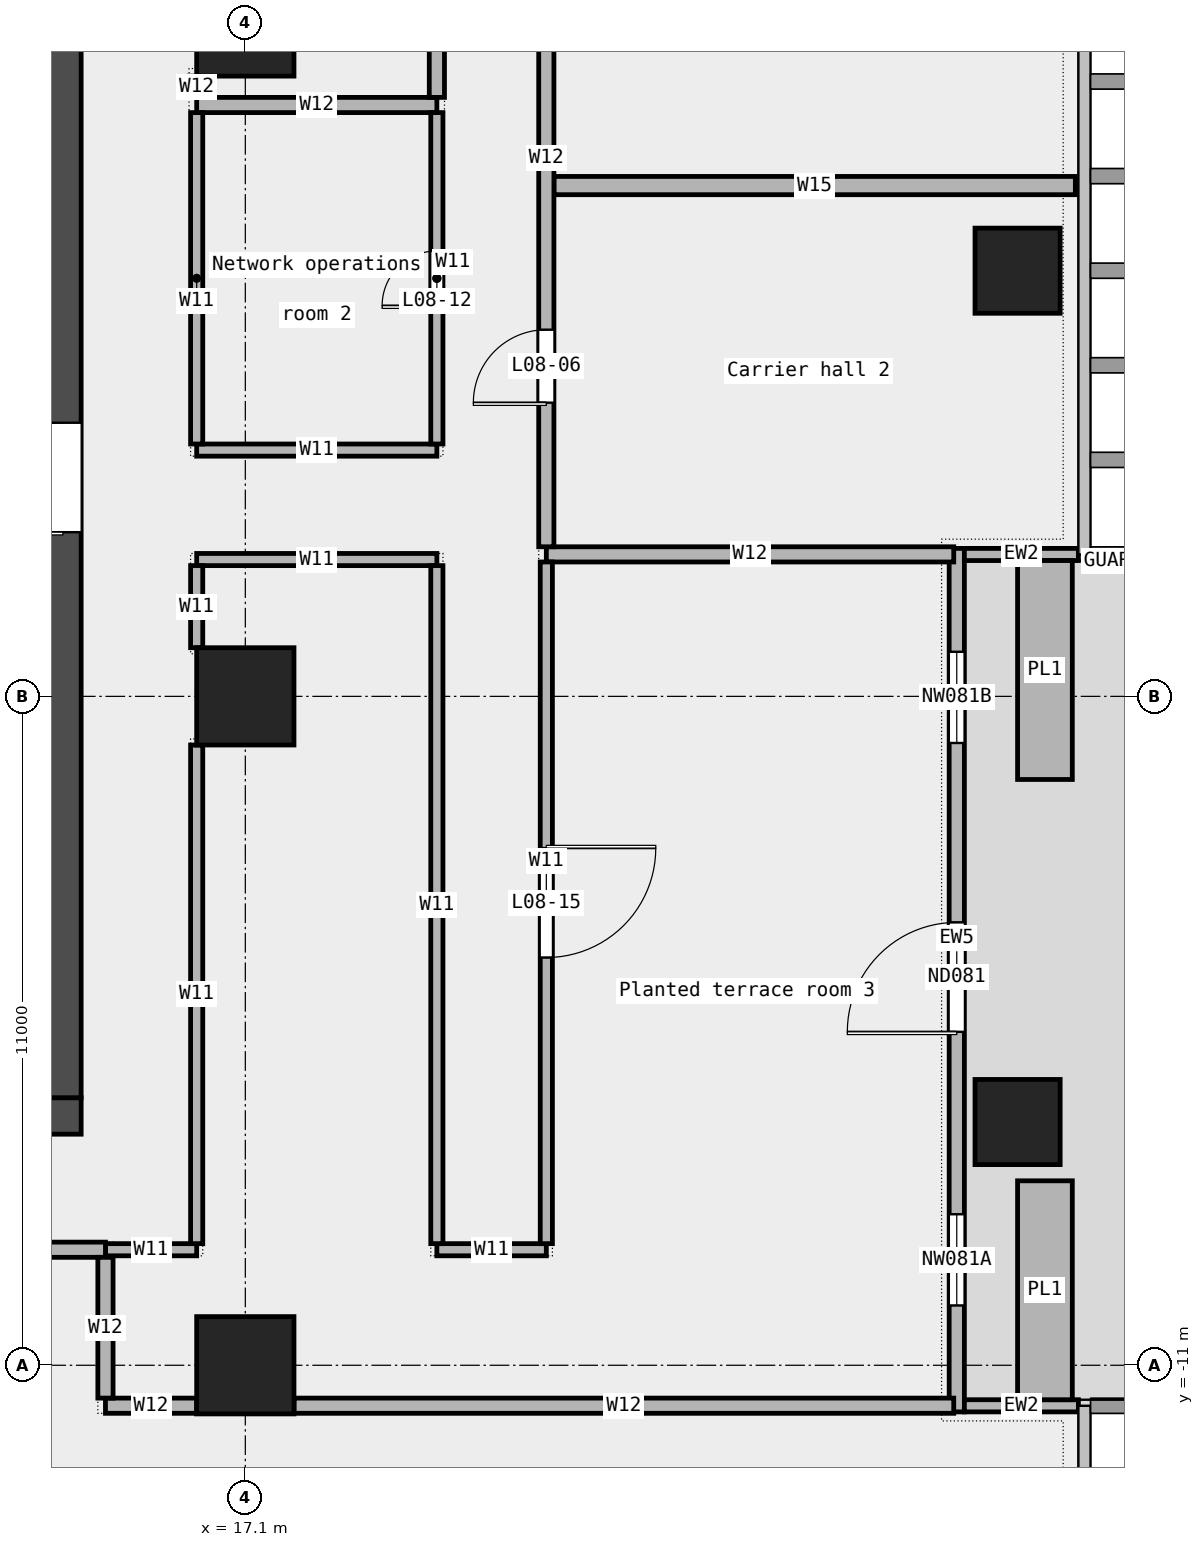
"""IFC4 building model, lengths in metres.
Left out: names, types, materials, properties, quantities, classifications, styles, units other than length and angle.
Written with IfcOpenShell. Run it as: python <this file> out.ifc"""

import sys

from ifc_helpers import new_model, si_unit, direction, frame, frame_2d, origin, origin_2d, place, context, subcontext, project, spatial, rectangle, extrude, element, fill, save


model = new_model("IFC4")
c1 = context("Model", 3, precision=1e-05, world=origin(), true_north=direction((0.0, 1.0)))
c2 = subcontext(c1, "Body", "Model", "MODEL_VIEW")
j1 = project(units=[si_unit("LENGTHUNIT", "METRE"), si_unit("PLANEANGLEUNIT", "RADIAN")], contexts=[c1])
p1 = place(None, origin())
s1 = spatial("IfcSite", under=j1, at=p1, CompositionType="ELEMENT")
p2 = place(p1, origin())
s2 = spatial("IfcBuilding", under=s1, at=p2, CompositionType="ELEMENT")
p3 = place(p2, frame((0.0, 0.0, 45.4)))
s3 = spatial("IfcBuildingStorey", under=s2, at=p3, CompositionType="ELEMENT", Elevation=45.4)
for number, where, z_axis, x_axis in (
    (1, (29.8, -7.0, 0.0), (0.0, 0.0, 1.0), (1.0, 0.0, 0.0)),
    (2, (29.8, 7.0, 0.0), (0.0, 0.0, 1.0), (1.0, 0.0, 0.0)),
):
    element("IfcColumn", number, at=place(p3, frame(where, z_axis=z_axis, x_axis=x_axis)), inside=s3, PredefinedType="COLUMN", context=c2, shape_type="SweptSolid", body=[
        extrude(rectangle(XDim=1.4, YDim=1.4, at=origin_2d()), origin(), (0.0, 0.0, 1.0), 4.35),
    ])
for number, where, z_axis, x_axis in (
    (3, (17.1, -11.0, 0.0), (0.0, 0.0, 1.0), (1.0, 0.0, 0.0)),
    (4, (17.1, 0.0, 0.0), (0.0, 0.0, 1.0), (1.0, 0.0, 0.0)),
    (5, (17.1, 11.0, 0.0), (0.0, 0.0, 1.0), (1.0, 0.0, 0.0)),
):
    element("IfcColumn", number, at=place(p3, frame(where, z_axis=z_axis, x_axis=x_axis)), inside=s3, PredefinedType="COLUMN", context=c2, shape_type="SweptSolid", body=[
        extrude(rectangle(XDim=1.6, YDim=1.6, at=origin_2d()), origin(), (0.0, 0.0, 1.0), 4.35),
    ])
p4 = place(p3, frame((28.8, -11.767, 0.0), z_axis=(0.0, 0.0, 1.0), x_axis=(0.0, 1.0, 0.0)))
e6 = element("IfcWall", 6, at=p4, inside=s3, PredefinedType="STANDARD", context=c2, shape_type="SweptSolid", body=[
    extrude(rectangle(XDim=14.2, YDim=0.25, at=frame_2d((7.1, 0.0))), origin(), (0.0, 0.0, 1.0), 4.35),
])
p5 = place(p4, frame((1.75, 0.0, 0.45)))
e7 = element("IfcOpeningElement", 7, at=p5, cuts=e6, PredefinedType="OPENING", context=c2, shape_type="SweptSolid", body=[
    extrude(rectangle(XDim=1.5, YDim=3.0, at=frame_2d((0.75, 1.5))), frame((0.0, 0.137, 0.0), z_axis=(0.0, -1.0, 0.0), x_axis=(1.0, 0.0, 0.0)), (0.0, 0.0, 1.0), 0.274),
])
p6 = place(p4, frame((6.25, 0.0, 0.0)))
e8 = element("IfcOpeningElement", 8, at=p6, cuts=e6, PredefinedType="OPENING", context=c2, shape_type="SweptSolid", body=[
    extrude(rectangle(XDim=1.8, YDim=2.4, at=frame_2d((0.9, 1.2))), frame((0.0, 0.137, 0.0), z_axis=(0.0, -1.0, 0.0), x_axis=(1.0, 0.0, 0.0)), (0.0, 0.0, 1.0), 0.274),
])
p7 = place(p4, frame((11.0, 0.0, 0.45)))
e9 = element("IfcOpeningElement", 9, at=p7, cuts=e6, PredefinedType="OPENING", context=c2, shape_type="SweptSolid", body=[
    extrude(rectangle(XDim=1.5, YDim=3.0, at=frame_2d((0.75, 1.5))), frame((0.0, 0.137, 0.0), z_axis=(0.0, -1.0, 0.0), x_axis=(1.0, 0.0, 0.0)), (0.0, 0.0, 1.0), 0.274),
])
for number, where, z_axis, x_axis in (
    (10, (30.8, -11.667, 0.0), (0.0, 0.0, 1.0), (-1.0, 0.0, 0.0)),
    (11, (30.8, 2.333, 0.0), (0.0, 0.0, 1.0), (-1.0, 0.0, 0.0)),
):
    element("IfcWall", number, at=place(p3, frame(where, z_axis=z_axis, x_axis=x_axis)), inside=s3, PredefinedType="STANDARD", context=c2, shape_type="SweptSolid", body=[
        extrude(rectangle(XDim=1.875, YDim=0.2, at=frame_2d((0.938, 0.0))), origin(), (0.0, 0.0, 1.0), 4.35),
    ])
for number, where, z_axis, x_axis in (
    (12, (30.25, -11.567, 0.0), (0.0, 0.0, 1.0), (0.0, 1.0, 0.0)),
    (13, (30.25, -1.367, 0.0), (0.0, 0.0, 1.0), (0.0, 1.0, 0.0)),
):
    element("IfcWall", number, at=place(p3, frame(where, z_axis=z_axis, x_axis=x_axis)), inside=s3, PredefinedType="STANDARD", context=c2, shape_type="SweptSolid", body=[
        extrude(rectangle(XDim=3.6, YDim=0.9, at=frame_2d((1.8, 0.0))), origin(), (0.0, 0.0, 1.0), 0.7),
    ])
p8 = place(p3, frame((14.8, -11.665, 0.0), z_axis=(0.0, 0.0, 1.0), x_axis=(1.0, 0.0, 0.0)))
e14 = element("IfcWall", 14, at=p8, inside=s3, PredefinedType="PARTITIONING", context=c2, shape_type="SweptSolid", body=[
    extrude(rectangle(XDim=1.5, YDim=0.25, at=frame_2d((0.75, 0.0))), origin(), (0.0, 0.0, 1.0), 4.35),
])
p9 = place(p3, frame((17.9, -11.665, 0.0), z_axis=(0.0, 0.0, 1.0), x_axis=(1.0, 0.0, 0.0)))
e15 = element("IfcWall", 15, at=p9, inside=s3, PredefinedType="PARTITIONING", context=c2, shape_type="SweptSolid", body=[
    extrude(rectangle(XDim=10.85, YDim=0.25, at=frame_2d((5.425, 0.0))), origin(), (0.0, 0.0, 1.0), 4.35),
])
p10 = place(p3, frame((14.8, -9.1, 0.0), z_axis=(0.0, 0.0, 1.0), x_axis=(1.0, 0.0, 0.0)))
e16 = element("IfcWall", 16, at=p10, inside=s3, PredefinedType="PARTITIONING", context=c2, shape_type="SweptSolid", body=[
    extrude(rectangle(XDim=1.5, YDim=0.2, at=frame_2d((0.75, 0.0))), origin(), (0.0, 0.0, 1.0), 4.35),
])
p11 = place(p3, frame((20.25, -9.1, 0.0), z_axis=(0.0, 0.0, 1.0), x_axis=(1.0, 0.0, 0.0)))
e17 = element("IfcWall", 17, at=p11, inside=s3, PredefinedType="PARTITIONING", context=c2, shape_type="SweptSolid", body=[
    extrude(rectangle(XDim=1.8, YDim=0.2, at=frame_2d((0.9, 0.0))), origin(), (0.0, 0.0, 1.0), 4.35),
])
p12 = place(p3, frame((-14.8, -9.1, 0.0), z_axis=(0.0, 0.0, 1.0), x_axis=(1.0, 0.0, 0.0)))
e18 = element("IfcWall", 18, at=p12, inside=s3, PredefinedType="PARTITIONING", context=c2, shape_type="SweptSolid", body=[
    extrude(rectangle(XDim=29.6, YDim=0.25, at=frame_2d((14.8, 0.0))), origin(), (0.0, 0.0, 1.0), 4.35),
])
p13 = place(p12, frame((4.802, 0.0, 0.0)))
e19 = element("IfcOpeningElement", 19, at=p13, cuts=e18, PredefinedType="OPENING", context=c2, shape_type="SweptSolid", body=[
    extrude(rectangle(XDim=1.8, YDim=2.1, at=frame_2d((0.9, 1.05))), frame((0.0, 0.137, 0.0), z_axis=(0.0, -1.0, 0.0), x_axis=(1.0, 0.0, 0.0)), (0.0, 0.0, 1.0), 0.274),
])
p14 = place(p12, frame((21.403, 0.0, 0.0)))
e20 = element("IfcOpeningElement", 20, at=p14, cuts=e18, PredefinedType="OPENING", context=c2, shape_type="SweptSolid", body=[
    extrude(rectangle(XDim=1.8, YDim=2.1, at=frame_2d((0.9, 1.05))), frame((0.0, 0.137, 0.0), z_axis=(0.0, -1.0, 0.0), x_axis=(1.0, 0.0, 0.0)), (0.0, 0.0, 1.0), 0.274),
])
p15 = place(p3, frame((16.3, 2.25, 0.0), z_axis=(0.0, 0.0, 1.0), x_axis=(1.0, 0.0, 0.0)))
e21 = element("IfcWall", 21, at=p15, inside=s3, PredefinedType="PARTITIONING", context=c2, shape_type="SweptSolid", body=[
    extrude(rectangle(XDim=3.95, YDim=0.2, at=frame_2d((1.975, 0.0))), origin(), (0.0, 0.0, 1.0), 4.35),
])
p16 = place(p3, frame((22.05, 2.335, 0.0), z_axis=(0.0, 0.0, 1.0), x_axis=(1.0, 0.0, 0.0)))
e22 = element("IfcWall", 22, at=p16, inside=s3, PredefinedType="PARTITIONING", context=c2, shape_type="SweptSolid", body=[
    extrude(rectangle(XDim=6.7, YDim=0.25, at=frame_2d((3.35, 0.0))), origin(), (0.0, 0.0, 1.0), 4.35),
])
p17 = place(p3, frame((16.3, 4.05, 0.0), z_axis=(0.0, 0.0, 1.0), x_axis=(1.0, 0.0, 0.0)))
e23 = element("IfcWall", 23, at=p17, inside=s3, PredefinedType="PARTITIONING", context=c2, shape_type="SweptSolid", body=[
    extrude(rectangle(XDim=3.95, YDim=0.2, at=frame_2d((1.975, 0.0))), origin(), (0.0, 0.0, 1.0), 4.35),
])
p18 = place(p3, frame((22.175, 8.4, 0.0), z_axis=(0.0, 0.0, 1.0), x_axis=(1.0, 0.0, 0.0)))
e24 = element("IfcWall", 24, at=p18, inside=s3, PredefinedType="PARTITIONING", context=c2, shape_type="SweptSolid", body=[
    extrude(rectangle(XDim=8.575, YDim=0.3, at=frame_2d((4.288, 0.0))), origin(), (0.0, 0.0, 1.0), 4.35),
])
p19 = place(p3, frame((16.3, 9.725, 0.0), z_axis=(0.0, 0.0, 1.0), x_axis=(1.0, 0.0, 0.0)))
e25 = element("IfcWall", 25, at=p19, inside=s3, PredefinedType="PARTITIONING", context=c2, shape_type="SweptSolid", body=[
    extrude(rectangle(XDim=3.95, YDim=0.25, at=frame_2d((1.975, 0.0))), origin(), (0.0, 0.0, 1.0), 4.35),
])
p20 = place(p3, frame((14.8, -11.54, 0.0), z_axis=(0.0, 0.0, 1.0), x_axis=(0.0, 1.0, 0.0)))
e26 = element("IfcWall", 26, at=p20, inside=s3, PredefinedType="PARTITIONING", context=c2, shape_type="SweptSolid", body=[
    extrude(rectangle(XDim=2.315, YDim=0.25, at=frame_2d((1.157, 0.0))), origin(), (0.0, 0.0, 1.0), 4.35),
])
p21 = place(p3, frame((16.3, -9.0, 0.0), z_axis=(0.0, 0.0, 1.0), x_axis=(0.0, 1.0, 0.0)))
e27 = element("IfcWall", 27, at=p21, inside=s3, PredefinedType="PARTITIONING", context=c2, shape_type="SweptSolid", body=[
    extrude(rectangle(XDim=8.2, YDim=0.2, at=frame_2d((4.1, 0.0))), origin(), (0.0, 0.0, 1.0), 4.35),
])
p22 = place(p3, frame((16.3, 0.8, 0.0), z_axis=(0.0, 0.0, 1.0), x_axis=(0.0, 1.0, 0.0)))
e28 = element("IfcWall", 28, at=p22, inside=s3, PredefinedType="PARTITIONING", context=c2, shape_type="SweptSolid", body=[
    extrude(rectangle(XDim=1.35, YDim=0.2, at=frame_2d((0.675, 0.0))), origin(), (0.0, 0.0, 1.0), 4.35),
])
p23 = place(p3, frame((16.3, 4.15, 0.0), z_axis=(0.0, 0.0, 1.0), x_axis=(0.0, 1.0, 0.0)))
e29 = element("IfcWall", 29, at=p23, inside=s3, PredefinedType="PARTITIONING", context=c2, shape_type="SweptSolid", body=[
    extrude(rectangle(XDim=5.45, YDim=0.2, at=frame_2d((2.725, 0.0))), origin(), (0.0, 0.0, 1.0), 4.35),
])
p24 = place(p3, frame((16.3, 9.85, 0.0), z_axis=(0.0, 0.0, 1.0), x_axis=(0.0, 1.0, 0.0)))
e30 = element("IfcWall", 30, at=p24, inside=s3, PredefinedType="PARTITIONING", context=c2, shape_type="SweptSolid", body=[
    extrude(rectangle(XDim=0.35, YDim=0.25, at=frame_2d((0.175, 0.0))), origin(), (0.0, 0.0, 1.0), 4.35),
])
p25 = place(p3, frame((20.25, -9.0, 0.0), z_axis=(0.0, 0.0, 1.0), x_axis=(0.0, 1.0, 0.0)))
e31 = element("IfcWall", 31, at=p25, inside=s3, PredefinedType="PARTITIONING", context=c2, shape_type="SweptSolid", body=[
    extrude(rectangle(XDim=11.15, YDim=0.2, at=frame_2d((5.575, 0.0))), origin(), (0.0, 0.0, 1.0), 4.35),
])
p26 = place(p3, frame((20.25, 4.15, 0.0), z_axis=(0.0, 0.0, 1.0), x_axis=(0.0, 1.0, 0.0)))
e32 = element("IfcWall", 32, at=p26, inside=s3, PredefinedType="PARTITIONING", context=c2, shape_type="SweptSolid", body=[
    extrude(rectangle(XDim=5.45, YDim=0.2, at=frame_2d((2.725, 0.0))), origin(), (0.0, 0.0, 1.0), 4.35),
])
p27 = place(p26, frame((2.275, 0.0, 0.0)))
e33 = element("IfcOpeningElement", 33, at=p27, cuts=e32, PredefinedType="OPENING", context=c2, shape_type="SweptSolid", body=[
    extrude(rectangle(XDim=0.9, YDim=2.1, at=frame_2d((0.45, 1.05))), frame((0.0, 0.112, 0.0), z_axis=(0.0, -1.0, 0.0), x_axis=(1.0, 0.0, 0.0)), (0.0, 0.0, 1.0), 0.224),
])
p28 = place(p3, frame((20.25, 9.85, 0.0), z_axis=(0.0, 0.0, 1.0), x_axis=(0.0, 1.0, 0.0)))
e34 = element("IfcWall", 34, at=p28, inside=s3, PredefinedType="PARTITIONING", context=c2, shape_type="SweptSolid", body=[
    extrude(rectangle(XDim=5.4, YDim=0.25, at=frame_2d((2.7, 0.0))), origin(), (0.0, 0.0, 1.0), 4.35),
])
p29 = place(p28, frame((2.25, 0.0, 0.0)))
e35 = element("IfcOpeningElement", 35, at=p29, cuts=e34, PredefinedType="OPENING", context=c2, shape_type="SweptSolid", body=[
    extrude(rectangle(XDim=0.9, YDim=2.1, at=frame_2d((0.45, 1.05))), frame((0.0, 0.137, 0.0), z_axis=(0.0, -1.0, 0.0), x_axis=(1.0, 0.0, 0.0)), (0.0, 0.0, 1.0), 0.274),
])
p30 = place(p3, frame((22.05, -9.0, 0.0), z_axis=(0.0, 0.0, 1.0), x_axis=(0.0, 1.0, 0.0)))
e36 = element("IfcWall", 36, at=p30, inside=s3, PredefinedType="PARTITIONING", context=c2, shape_type="SweptSolid", body=[
    extrude(rectangle(XDim=11.21, YDim=0.2, at=frame_2d((5.605, 0.0))), origin(), (0.0, 0.0, 1.0), 4.35),
])
p31 = place(p30, frame((4.705, 0.0, 0.0)))
e37 = element("IfcOpeningElement", 37, at=p31, cuts=e36, PredefinedType="OPENING", context=c2, shape_type="SweptSolid", body=[
    extrude(rectangle(XDim=1.8, YDim=2.1, at=frame_2d((0.9, 1.05))), frame((0.0, 0.112, 0.0), z_axis=(0.0, -1.0, 0.0), x_axis=(1.0, 0.0, 0.0)), (0.0, 0.0, 1.0), 0.224),
])
p32 = place(p3, frame((22.05, 2.46, 0.0), z_axis=(0.0, 0.0, 1.0), x_axis=(0.0, 1.0, 0.0)))
e38 = element("IfcWall", 38, at=p32, inside=s3, PredefinedType="PARTITIONING", context=c2, shape_type="SweptSolid", body=[
    extrude(rectangle(XDim=12.79, YDim=0.25, at=frame_2d((6.395, 0.0))), origin(), (0.0, 0.0, 1.0), 4.35),
])
p33 = place(p32, frame((2.37, 0.0, 0.0)))
e39 = element("IfcOpeningElement", 39, at=p33, cuts=e38, PredefinedType="OPENING", context=c2, shape_type="SweptSolid", body=[
    extrude(rectangle(XDim=1.2, YDim=2.1, at=frame_2d((0.6, 1.05))), frame((0.0, 0.137, 0.0), z_axis=(0.0, -1.0, 0.0), x_axis=(1.0, 0.0, 0.0)), (0.0, 0.0, 1.0), 0.274),
])
p34 = place(p32, frame((8.765, 0.0, 0.0)))
e40 = element("IfcOpeningElement", 40, at=p34, cuts=e38, PredefinedType="OPENING", context=c2, shape_type="SweptSolid", body=[
    extrude(rectangle(XDim=1.2, YDim=2.1, at=frame_2d((0.6, 1.05))), frame((0.0, 0.137, 0.0), z_axis=(0.0, -1.0, 0.0), x_axis=(1.0, 0.0, 0.0)), (0.0, 0.0, 1.0), 0.274),
])
p35 = place(p3, frame((-14.4, -6.9, 0.0), z_axis=(0.0, 0.0, 1.0), x_axis=(1.0, 0.0, 0.0)))
e41 = element("IfcWall", 41, at=p35, inside=s3, PredefinedType="SHEAR", context=c2, shape_type="SweptSolid", body=[
    extrude(rectangle(XDim=28.8, YDim=0.6, at=frame_2d((14.4, 0.0))), origin(), (0.0, 0.0, 1.0), 4.5),
])
p36 = place(p35, frame((4.9, 0.0, 0.0)))
e42 = element("IfcOpeningElement", 42, at=p36, cuts=e41, PredefinedType="OPENING", context=c2, shape_type="SweptSolid", body=[
    extrude(rectangle(XDim=1.0, YDim=2.1, at=frame_2d((0.5, 1.05))), frame((0.0, 0.312, 0.0), z_axis=(0.0, -1.0, 0.0), x_axis=(1.0, 0.0, 0.0)), (0.0, 0.0, 1.0), 0.624),
])
p37 = place(p35, frame((8.462, 0.0, 0.0)))
e43 = element("IfcOpeningElement", 43, at=p37, cuts=e41, PredefinedType="OPENING", context=c2, shape_type="SweptSolid", body=[
    extrude(rectangle(XDim=1.0, YDim=2.1, at=frame_2d((0.5, 1.05))), frame((0.0, 0.312, 0.0), z_axis=(0.0, -1.0, 0.0), x_axis=(1.0, 0.0, 0.0)), (0.0, 0.0, 1.0), 0.624),
])
p38 = place(p35, frame((13.425, 0.0, 0.0)))
e44 = element("IfcOpeningElement", 44, at=p38, cuts=e41, PredefinedType="OPENING", context=c2, shape_type="SweptSolid", body=[
    extrude(rectangle(XDim=1.2, YDim=2.1, at=frame_2d((0.6, 1.05))), frame((0.0, 0.312, 0.0), z_axis=(0.0, -1.0, 0.0), x_axis=(1.0, 0.0, 0.0)), (0.0, 0.0, 1.0), 0.624),
])
p39 = place(p35, frame((18.75, 0.0, 0.0)))
e45 = element("IfcOpeningElement", 45, at=p39, cuts=e41, PredefinedType="OPENING", context=c2, shape_type="SweptSolid", body=[
    extrude(rectangle(XDim=1.8, YDim=2.1, at=frame_2d((0.9, 1.05))), frame((0.0, 0.312, 0.0), z_axis=(0.0, -1.0, 0.0), x_axis=(1.0, 0.0, 0.0)), (0.0, 0.0, 1.0), 0.624),
])
p40 = place(p35, frame((23.087, 0.0, 0.0)))
e46 = element("IfcOpeningElement", 46, at=p40, cuts=e41, PredefinedType="OPENING", context=c2, shape_type="SweptSolid", body=[
    extrude(rectangle(XDim=1.0, YDim=2.1, at=frame_2d((0.5, 1.05))), frame((0.0, 0.312, 0.0), z_axis=(0.0, -1.0, 0.0), x_axis=(1.0, 0.0, 0.0)), (0.0, 0.0, 1.0), 0.624),
])
p41 = place(p3, frame((14.1, -6.6, 0.0), z_axis=(0.0, 0.0, 1.0), x_axis=(0.0, 1.0, 0.0)))
e47 = element("IfcWall", 47, at=p41, inside=s3, PredefinedType="SHEAR", context=c2, shape_type="SweptSolid", body=[
    extrude(rectangle(XDim=19.5, YDim=0.6, at=frame_2d((9.75, 0.0))), origin(), (0.0, 0.0, 1.0), 4.5),
])
p42 = place(p41, frame((9.3, 0.0, 0.0)))
e48 = element("IfcOpeningElement", 48, at=p42, cuts=e47, PredefinedType="OPENING", context=c2, shape_type="SweptSolid", body=[
    extrude(rectangle(XDim=1.8, YDim=2.1, at=frame_2d((0.9, 1.05))), frame((0.0, 0.312, 0.0), z_axis=(0.0, -1.0, 0.0), x_axis=(1.0, 0.0, 0.0)), (0.0, 0.0, 1.0), 0.624),
])
p43 = place(p5, origin())
e49 = element("IfcWindow", 49, at=p43, inside=s3, PartitioningType="SINGLE_PANEL", PredefinedType="WINDOW", context=c2, shape_type="SweptSolid", body=[
    extrude(rectangle(XDim=1.5, YDim=3.0, at=frame_2d((0.75, 1.5))), frame((0.0, 0.03, 0.0), z_axis=(0.0, -1.0, 0.0), x_axis=(1.0, 0.0, 0.0)), (0.0, 0.0, 1.0), 0.06),
])
fill(e7, e49)
p44 = place(p6, origin())
e50 = element("IfcDoor", 50, at=p44, inside=s3, OperationType="DOUBLE_DOOR_SINGLE_SWING", PredefinedType="DOOR", context=c2, shape_type="SweptSolid", body=[
    extrude(rectangle(XDim=1.8, YDim=2.4, at=frame_2d((0.9, 1.2))), frame((0.0, 0.025, 0.0), z_axis=(0.0, -1.0, 0.0), x_axis=(1.0, 0.0, 0.0)), (0.0, 0.0, 1.0), 0.05),
])
fill(e8, e50)
p45 = place(p7, origin())
e51 = element("IfcWindow", 51, at=p45, inside=s3, PartitioningType="SINGLE_PANEL", PredefinedType="WINDOW", context=c2, shape_type="SweptSolid", body=[
    extrude(rectangle(XDim=1.5, YDim=3.0, at=frame_2d((0.75, 1.5))), frame((0.0, 0.03, 0.0), z_axis=(0.0, -1.0, 0.0), x_axis=(1.0, 0.0, 0.0)), (0.0, 0.0, 1.0), 0.06),
])
fill(e9, e51)
p46 = place(p33, origin())
e52 = element("IfcDoor", 52, at=p46, inside=s3, OperationType="SINGLE_SWING_LEFT", PredefinedType="DOOR", context=c2, shape_type="SweptSolid", body=[
    extrude(rectangle(XDim=1.2, YDim=2.1, at=frame_2d((0.6, 1.05))), frame((0.0, 0.025, 0.0), z_axis=(0.0, -1.0, 0.0), x_axis=(1.0, 0.0, 0.0)), (0.0, 0.0, 1.0), 0.05),
])
fill(e39, e52)
p47 = place(p27, origin())
e53 = element("IfcDoor", 53, at=p47, inside=s3, OperationType="SINGLE_SWING_LEFT", PredefinedType="DOOR", context=c2, shape_type="SweptSolid", body=[
    extrude(rectangle(XDim=0.9, YDim=2.1, at=frame_2d((0.45, 1.05))), frame((0.0, 0.025, 0.0), z_axis=(0.0, -1.0, 0.0), x_axis=(1.0, 0.0, 0.0)), (0.0, 0.0, 1.0), 0.05),
])
fill(e33, e53)
p48 = place(p31, origin())
e54 = element("IfcDoor", 54, at=p48, inside=s3, OperationType="DOUBLE_DOOR_SINGLE_SWING", PredefinedType="DOOR", context=c2, shape_type="SweptSolid", body=[
    extrude(rectangle(XDim=1.8, YDim=2.1, at=frame_2d((0.9, 1.05))), frame((0.0, 0.025, 0.0), z_axis=(0.0, -1.0, 0.0), x_axis=(1.0, 0.0, 0.0)), (0.0, 0.0, 1.0), 0.05),
])
fill(e37, e54)
p49 = place(p42, origin())
e55 = element("IfcDoor", 55, at=p49, inside=s3, OperationType="DOUBLE_DOOR_SINGLE_SWING", PredefinedType="DOOR", context=c2, shape_type="SweptSolid", body=[
    extrude(rectangle(XDim=1.8, YDim=2.1, at=frame_2d((0.9, 1.05))), frame((0.0, 0.025, 0.0), z_axis=(0.0, -1.0, 0.0), x_axis=(1.0, 0.0, 0.0)), (0.0, 0.0, 1.0), 0.05),
])
fill(e48, e55)
save(model, sys.argv[1])
